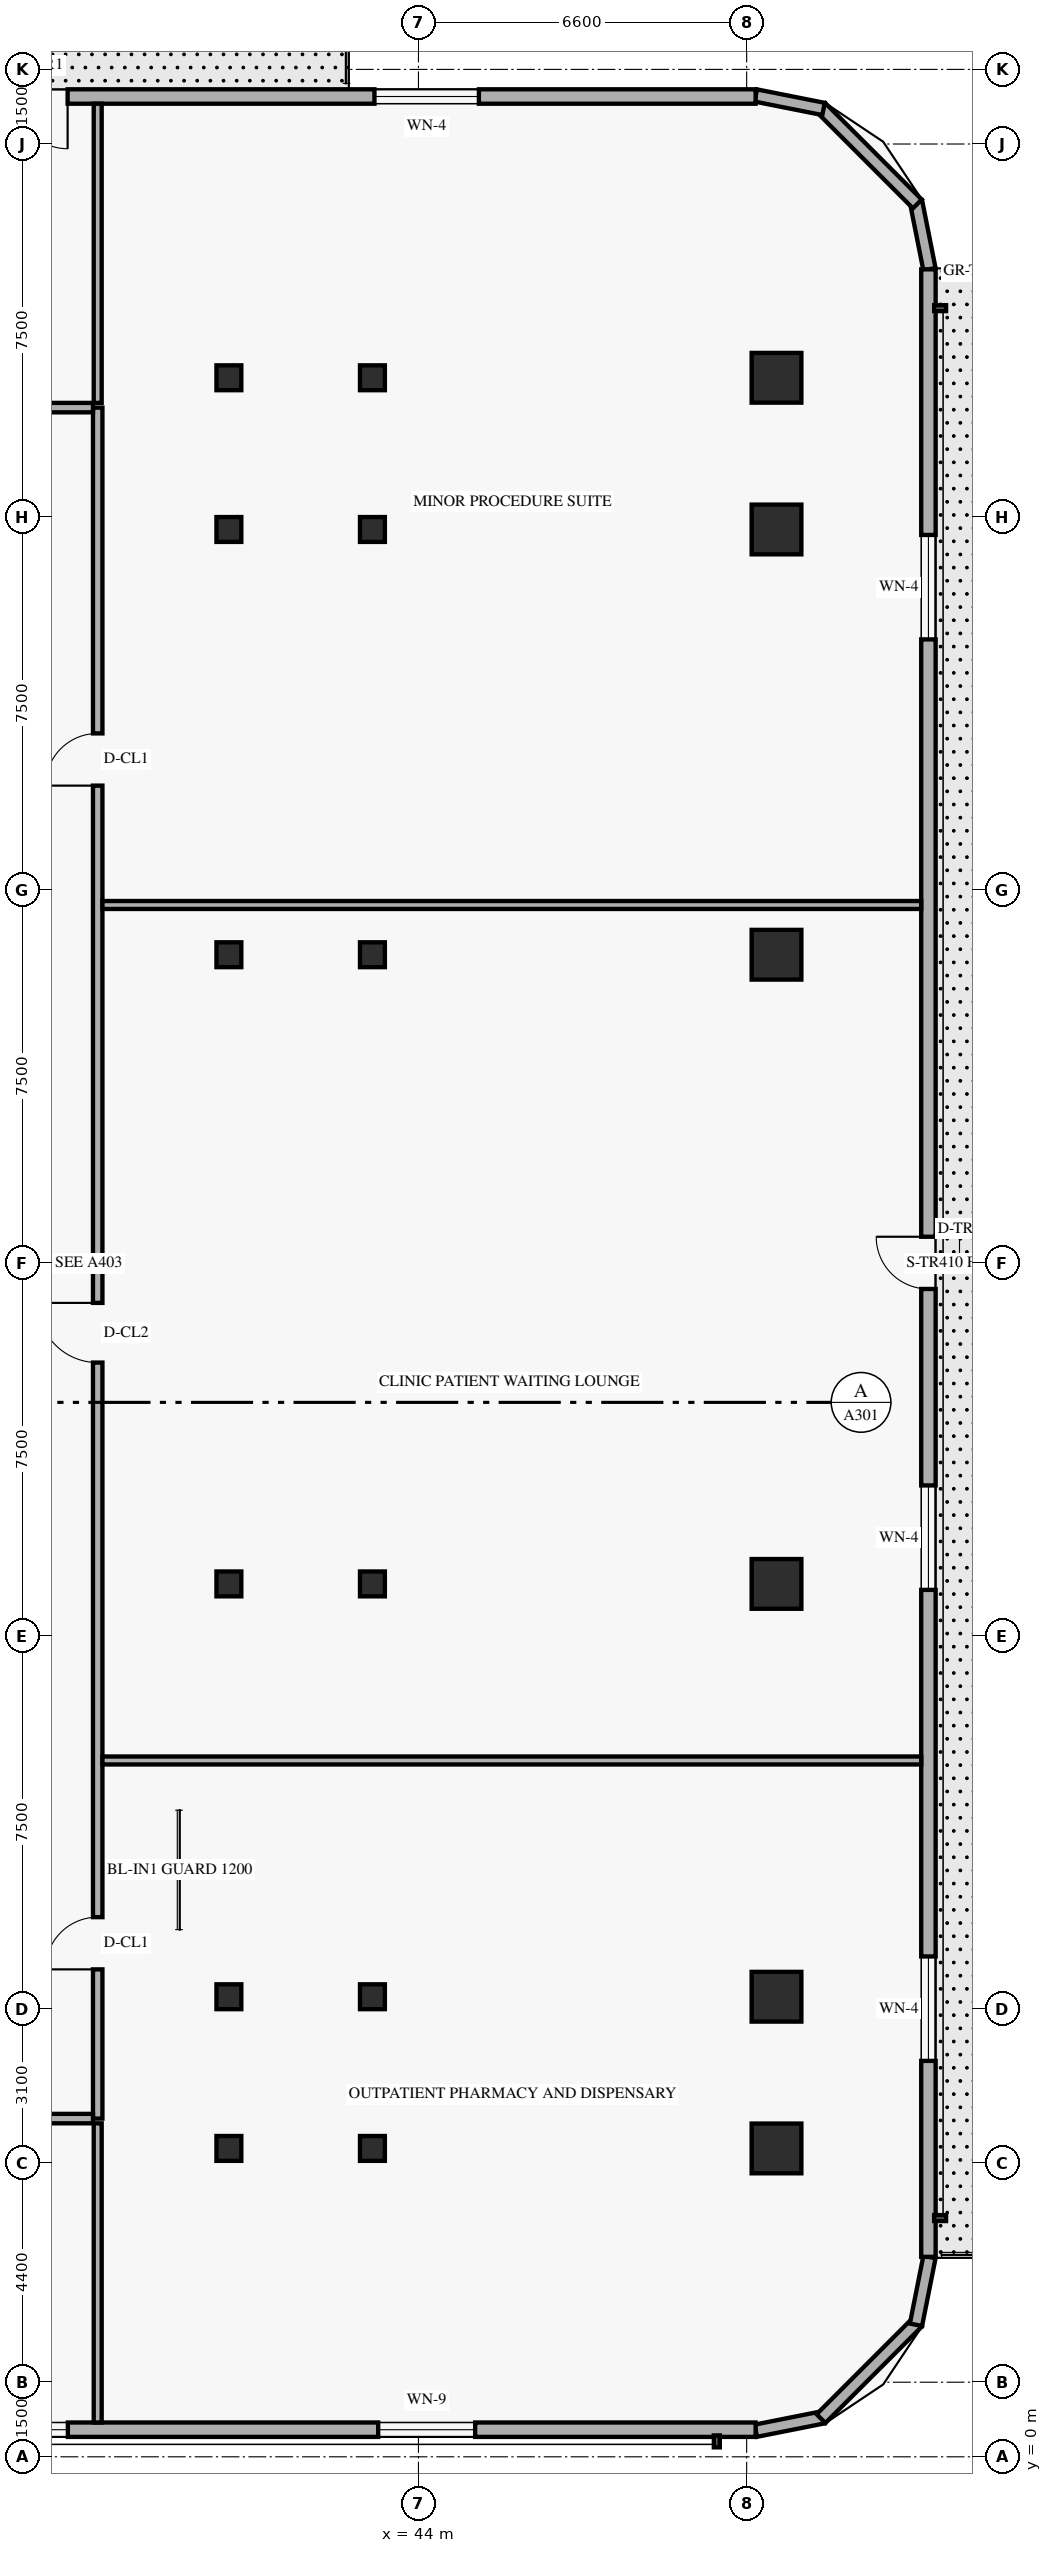
"""IFC4 building model, lengths in metres.
Left out: names, types, materials, properties, quantities, classifications, styles, units other than length and angle.
Written with IfcOpenShell. Run it as: python <this file> out.ifc"""

import sys

from ifc_helpers import new_model, si_unit, direction, frame, frame_2d, origin, origin_2d, place, context, subcontext, project, spatial, rectangle, hollow_rectangle, extrude, element, fill, save


model = new_model("IFC4")
c1 = context("Model", 3, precision=1e-05, world=origin(), true_north=direction((0.0, 1.0)))
c2 = subcontext(c1, "Body", "Model", "MODEL_VIEW")
j1 = project(units=[si_unit("LENGTHUNIT", "METRE"), si_unit("PLANEANGLEUNIT", "RADIAN")], contexts=[c1])
p1 = place(None, origin())
s1 = spatial("IfcSite", under=j1, at=p1, CompositionType="ELEMENT")
p2 = place(p1, origin())
s2 = spatial("IfcBuilding", under=s1, at=p2, CompositionType="ELEMENT")
p3 = place(p2, frame((0.0, 0.0, 4.8)))
s3 = spatial("IfcBuildingStorey", under=s2, at=p3, CompositionType="ELEMENT", Elevation=4.8)
for number, where, z_axis, x_axis in (
    (1, (40.104, 6.2, 0.0), (0.035, 0.0, 0.999), (0.0, 1.0, 0.0)),
    (2, (40.104, 9.25, 0.0), (0.035, 0.0, 0.999), (0.0, 1.0, 0.0)),
    (3, (40.104, 17.55, 0.0), (0.035, 0.0, 0.999), (0.0, 1.0, 0.0)),
    (4, (40.104, 30.2, 0.0), (0.035, 0.0, 0.999), (0.0, 1.0, 0.0)),
    (5, (40.104, 38.75, 0.0), (0.035, 0.0, 0.999), (0.0, 1.0, 0.0)),
    (6, (40.104, 41.8, 0.0), (0.035, 0.0, 0.999), (0.0, 1.0, 0.0)),
):
    element("IfcColumn", number, at=place(p3, frame(where, z_axis=z_axis, x_axis=x_axis)), inside=s3, PredefinedType="COLUMN", context=c2, shape_type="SweptSolid", body=[
        extrude(hollow_rectangle(XDim=0.5, YDim=0.5, WallThickness=0.022, at=origin_2d()), origin(), (0.0, 0.0, 1.0), 4.803),
    ])
for number, where, z_axis, x_axis in (
    (7, (42.935, 6.2, 0.0), (0.058, 0.0, 0.998), (0.0, 1.0, 0.0)),
    (8, (42.935, 9.25, 0.0), (0.058, 0.0, 0.998), (0.0, 1.0, 0.0)),
    (9, (42.935, 17.55, 0.0), (0.058, 0.0, 0.998), (0.0, 1.0, 0.0)),
    (10, (42.935, 30.2, 0.0), (0.058, 0.0, 0.998), (0.0, 1.0, 0.0)),
    (11, (42.935, 38.75, 0.0), (0.058, 0.0, 0.998), (0.0, 1.0, 0.0)),
    (12, (42.935, 41.8, 0.0), (0.058, 0.0, 0.998), (0.0, 1.0, 0.0)),
):
    element("IfcColumn", number, at=place(p3, frame(where, z_axis=z_axis, x_axis=x_axis)), inside=s3, PredefinedType="COLUMN", context=c2, shape_type="SweptSolid", body=[
        extrude(hollow_rectangle(XDim=0.5, YDim=0.5, WallThickness=0.022, at=origin_2d()), origin(), (0.0, 0.0, 1.0), 4.808),
    ])
for number, where, z_axis, x_axis in (
    (13, (51.2, 6.2, 0.0), (0.0, 0.0, 1.0), (1.0, 0.0, 0.0)),
    (14, (51.2, 9.25, 0.0), (0.0, 0.0, 1.0), (1.0, 0.0, 0.0)),
    (15, (51.2, 17.55, 0.0), (0.0, 0.0, 1.0), (1.0, 0.0, 0.0)),
    (16, (51.2, 30.2, 0.0), (0.0, 0.0, 1.0), (1.0, 0.0, 0.0)),
    (17, (51.2, 38.75, 0.0), (0.0, 0.0, 1.0), (1.0, 0.0, 0.0)),
    (18, (51.2, 41.8, 0.0), (0.0, 0.0, 1.0), (1.0, 0.0, 0.0)),
):
    element("IfcColumn", number, at=place(p3, frame(where, z_axis=z_axis, x_axis=x_axis)), inside=s3, PredefinedType="COLUMN", context=c2, shape_type="SweptSolid", body=[
        extrude(rectangle(XDim=1.0, YDim=1.0, at=origin_2d()), origin(), (0.0, 0.0, 1.0), 4.8),
    ])
p4 = place(p3, frame((50.783, 0.524, 0.0), z_axis=(0.0, 0.0, 1.0), x_axis=(0.980809899341, 0.19496651342, 0.0)))
e19 = element("IfcWall", 19, at=p4, inside=s3, PredefinedType="SOLIDWALL", context=c2, shape_type="SweptSolid", body=[
    extrude(rectangle(XDim=1.389, YDim=0.25, at=frame_2d((0.694, 0.0))), origin(), (0.0, 0.0, 1.0), 4.52),
])
p5 = place(p3, frame((52.095, 0.768, 0.0), z_axis=(0.0, 0.0, 1.0), x_axis=(0.707106781187, 0.707106781187, 0.0)))
e20 = element("IfcWall", 20, at=p5, inside=s3, PredefinedType="SOLIDWALL", context=c2, shape_type="SweptSolid", body=[
    extrude(rectangle(XDim=2.739, YDim=0.25, at=frame_2d((1.37, 0.0))), origin(), (0.0, 0.0, 1.0), 4.52),
])
for number, where, z_axis, x_axis in (
    (21, (54.005, 2.655, 0.0), (0.0, 0.0, 1.0), (0.195, 0.981, 0.0)),
    (22, (54.276, 43.983, 0.0), (0.0, 0.0, 1.0), (-0.195, 0.981, 0.0)),
):
    element("IfcWall", number, at=place(p3, frame(where, z_axis=z_axis, x_axis=x_axis)), inside=s3, PredefinedType="SOLIDWALL", context=c2, shape_type="SweptSolid", body=[
        extrude(rectangle(XDim=1.389, YDim=0.25, at=frame_2d((0.694, 0.0))), origin(), (0.0, 0.0, 1.0), 4.52),
    ])
p6 = place(p3, frame((54.032, 45.295, 0.0), z_axis=(0.0, 0.0, 1.0), x_axis=(-0.707106781187, 0.707106781187, 0.0)))
e23 = element("IfcWall", 23, at=p6, inside=s3, PredefinedType="SOLIDWALL", context=c2, shape_type="SweptSolid", body=[
    extrude(rectangle(XDim=2.739, YDim=0.25, at=frame_2d((1.37, 0.0))), origin(), (0.0, 0.0, 1.0), 4.52),
])
p7 = place(p3, frame((52.146, 47.205, 0.0), z_axis=(0.0, 0.0, 1.0), x_axis=(-0.980809899341, 0.19496651342, 0.0)))
e24 = element("IfcWall", 24, at=p7, inside=s3, PredefinedType="SOLIDWALL", context=c2, shape_type="SweptSolid", body=[
    extrude(rectangle(XDim=1.389, YDim=0.25, at=frame_2d((0.694, 0.0))), origin(), (0.0, 0.0, 1.0), 4.52),
])
p8 = place(p3, frame((34.4, 0.545, 0.0), z_axis=(0.0, 0.0, 1.0), x_axis=(1.0, 0.0, 0.0)))
e25 = element("IfcWall", 25, at=p8, inside=s3, PredefinedType="SOLIDWALL", context=c2, shape_type="SweptSolid", body=[
    extrude(rectangle(XDim=16.38, YDim=0.29, at=frame_2d((8.19, 0.0))), origin(), (0.0, 0.0, 1.0), 4.52),
])
p9 = place(p8, frame((0.6, 0.0, 0.85)))
e26 = element("IfcOpeningElement", 26, at=p9, cuts=e25, PredefinedType="OPENING", context=c2, shape_type="SweptSolid", body=[
    extrude(rectangle(XDim=1.95, YDim=1.75, at=frame_2d((0.975, 0.875))), frame((0.0, 0.155, 0.0), z_axis=(0.0, -1.0, 0.0), x_axis=(1.0, 0.0, 0.0)), (0.0, 0.0, 1.0), 0.31),
])
p10 = place(p8, frame((8.79, 0.0, 0.85)))
e27 = element("IfcOpeningElement", 27, at=p10, cuts=e25, PredefinedType="OPENING", context=c2, shape_type="SweptSolid", body=[
    extrude(rectangle(XDim=1.95, YDim=1.75, at=frame_2d((0.975, 0.875))), frame((0.0, 0.155, 0.0), z_axis=(0.0, -1.0, 0.0), x_axis=(1.0, 0.0, 0.0)), (0.0, 0.0, 1.0), 0.31),
])
p11 = place(p3, frame((54.255, 4.02, 0.0), z_axis=(0.0, 0.0, 1.0), x_axis=(0.0, 1.0, 0.0)))
e28 = element("IfcWall", 28, at=p11, inside=s3, PredefinedType="SOLIDWALL", context=c2, shape_type="SweptSolid", body=[
    extrude(rectangle(XDim=39.96, YDim=0.29, at=frame_2d((19.98, 0.0))), origin(), (0.0, 0.0, 1.0), 4.52),
])
p12 = place(p11, frame((19.46, 0.0, 0.0)))
e29 = element("IfcOpeningElement", 29, at=p12, cuts=e28, PredefinedType="OPENING", context=c2, shape_type="SweptSolid", body=[
    extrude(rectangle(XDim=1.05, YDim=2.15, at=frame_2d((0.525, 1.075))), frame((0.0, 0.155, 0.0), z_axis=(0.0, -1.0, 0.0), x_axis=(1.0, 0.0, 0.0)), (0.0, 0.0, 1.0), 0.31),
])
p13 = place(p11, frame((3.94, 0.0, 0.85)))
e30 = element("IfcOpeningElement", 30, at=p13, cuts=e28, PredefinedType="OPENING", context=c2, shape_type="SweptSolid", body=[
    extrude(rectangle(XDim=2.1, YDim=1.75, at=frame_2d((1.05, 0.875))), frame((0.0, 0.155, 0.0), z_axis=(0.0, -1.0, 0.0), x_axis=(1.0, 0.0, 0.0)), (0.0, 0.0, 1.0), 0.31),
])
p14 = place(p11, frame((13.41, 0.0, 0.85)))
e31 = element("IfcOpeningElement", 31, at=p14, cuts=e28, PredefinedType="OPENING", context=c2, shape_type="SweptSolid", body=[
    extrude(rectangle(XDim=2.1, YDim=1.75, at=frame_2d((1.05, 0.875))), frame((0.0, 0.155, 0.0), z_axis=(0.0, -1.0, 0.0), x_axis=(1.0, 0.0, 0.0)), (0.0, 0.0, 1.0), 0.31),
])
p15 = place(p11, frame((32.52, 0.0, 0.85)))
e32 = element("IfcOpeningElement", 32, at=p15, cuts=e28, PredefinedType="OPENING", context=c2, shape_type="SweptSolid", body=[
    extrude(rectangle(XDim=2.1, YDim=1.75, at=frame_2d((1.05, 0.875))), frame((0.0, 0.155, 0.0), z_axis=(0.0, -1.0, 0.0), x_axis=(1.0, 0.0, 0.0)), (0.0, 0.0, 1.0), 0.31),
])
p16 = place(p3, frame((50.78, 47.455, 0.0), z_axis=(0.0, 0.0, 1.0), x_axis=(-1.0, 0.0, 0.0)))
e33 = element("IfcWall", 33, at=p16, inside=s3, PredefinedType="SOLIDWALL", context=c2, shape_type="SweptSolid", body=[
    extrude(rectangle(XDim=46.36, YDim=0.29, at=frame_2d((23.18, 0.0))), origin(), (0.0, 0.0, 1.0), 4.52),
])
p17 = place(p16, frame((13.835, 0.0, 0.0)))
e34 = element("IfcOpeningElement", 34, at=p17, cuts=e33, PredefinedType="OPENING", context=c2, shape_type="SweptSolid", body=[
    extrude(rectangle(XDim=1.05, YDim=2.15, at=frame_2d((0.525, 1.075))), frame((0.0, 0.155, 0.0), z_axis=(0.0, -1.0, 0.0), x_axis=(1.0, 0.0, 0.0)), (0.0, 0.0, 1.0), 0.31),
])
p18 = place(p16, frame((27.13, 0.0, 0.0)))
e35 = element("IfcOpeningElement", 35, at=p18, cuts=e33, PredefinedType="OPENING", context=c2, shape_type="SweptSolid", body=[
    extrude(rectangle(XDim=1.4, YDim=2.15, at=frame_2d((0.7, 1.075))), frame((0.0, 0.155, 0.0), z_axis=(0.0, -1.0, 0.0), x_axis=(1.0, 0.0, 0.0)), (0.0, 0.0, 1.0), 0.31),
])
p19 = place(p16, frame((41.945, 0.0, 0.85)))
e36 = element("IfcOpeningElement", 36, at=p19, cuts=e33, PredefinedType="OPENING", context=c2, shape_type="SweptSolid", body=[
    extrude(rectangle(XDim=2.1, YDim=1.75, at=frame_2d((1.05, 0.875))), frame((0.0, 0.155, 0.0), z_axis=(0.0, -1.0, 0.0), x_axis=(1.0, 0.0, 0.0)), (0.0, 0.0, 1.0), 0.31),
])
p20 = place(p16, frame((19.982, 0.0, 0.85)))
e37 = element("IfcOpeningElement", 37, at=p20, cuts=e33, PredefinedType="OPENING", context=c2, shape_type="SweptSolid", body=[
    extrude(rectangle(XDim=2.1, YDim=1.75, at=frame_2d((1.05, 0.875))), frame((0.0, 0.155, 0.0), z_axis=(0.0, -1.0, 0.0), x_axis=(1.0, 0.0, 0.0)), (0.0, 0.0, 1.0), 0.31),
])
p21 = place(p16, frame((5.565, 0.0, 0.85)))
e38 = element("IfcOpeningElement", 38, at=p21, cuts=e33, PredefinedType="OPENING", context=c2, shape_type="SweptSolid", body=[
    extrude(rectangle(XDim=2.1, YDim=1.75, at=frame_2d((1.05, 0.875))), frame((0.0, 0.155, 0.0), z_axis=(0.0, -1.0, 0.0), x_axis=(1.0, 0.0, 0.0)), (0.0, 0.0, 1.0), 0.31),
])
p22 = place(p3, frame((37.55, 6.8, 0.0), z_axis=(0.0, 0.0, 1.0), x_axis=(0.0, 1.0, 0.0)))
e39 = element("IfcWall", 39, at=p22, inside=s3, PredefinedType="STANDARD", context=c2, shape_type="SweptSolid", body=[
    extrude(rectangle(XDim=34.4, YDim=0.19, at=frame_2d((17.2, 0.0))), origin(), (0.0, 0.0, 1.0), 3.502),
])
p23 = place(p22, frame((3.0, 0.0, 0.0)))
e40 = element("IfcOpeningElement", 40, at=p23, cuts=e39, PredefinedType="OPENING", context=c2, shape_type="SweptSolid", body=[
    extrude(rectangle(XDim=1.05, YDim=2.15, at=frame_2d((0.525, 1.075))), frame((0.0, 0.105, 0.0), z_axis=(0.0, -1.0, 0.0), x_axis=(1.0, 0.0, 0.0)), (0.0, 0.0, 1.0), 0.21),
])
p24 = place(p22, frame((15.2, 0.0, 0.0)))
e41 = element("IfcOpeningElement", 41, at=p24, cuts=e39, PredefinedType="OPENING", context=c2, shape_type="SweptSolid", body=[
    extrude(rectangle(XDim=1.2, YDim=2.15, at=frame_2d((0.6, 1.075))), frame((0.0, 0.105, 0.0), z_axis=(0.0, -1.0, 0.0), x_axis=(1.0, 0.0, 0.0)), (0.0, 0.0, 1.0), 0.21),
])
p25 = place(p22, frame((26.8, 0.0, 0.0)))
e42 = element("IfcOpeningElement", 42, at=p25, cuts=e39, PredefinedType="OPENING", context=c2, shape_type="SweptSolid", body=[
    extrude(rectangle(XDim=1.05, YDim=2.15, at=frame_2d((0.525, 1.075))), frame((0.0, 0.105, 0.0), z_axis=(0.0, -1.0, 0.0), x_axis=(1.0, 0.0, 0.0)), (0.0, 0.0, 1.0), 0.21),
])
p26 = place(p3, frame((13.0, 6.8, 0.0), z_axis=(0.0, 0.0, 1.0), x_axis=(1.0, 0.0, 0.0)))
e43 = element("IfcWall", 43, at=p26, inside=s3, PredefinedType="STANDARD", context=c2, shape_type="SweptSolid", body=[
    extrude(rectangle(XDim=24.455, YDim=0.19, at=frame_2d((12.228, 0.0))), origin(), (0.0, 0.0, 1.0), 3.732),
])
p27 = place(p26, frame((9.0, 0.0, 0.0)))
e44 = element("IfcOpeningElement", 44, at=p27, cuts=e43, PredefinedType="OPENING", context=c2, shape_type="SweptSolid", body=[
    extrude(rectangle(XDim=0.95, YDim=2.15, at=frame_2d((0.475, 1.075))), frame((0.0, 0.105, 0.0), z_axis=(0.0, -1.0, 0.0), x_axis=(1.0, 0.0, 0.0)), (0.0, 0.0, 1.0), 0.21),
])
p28 = place(p3, frame((13.0, 41.2, 0.0), z_axis=(0.0, 0.0, 1.0), x_axis=(1.0, 0.0, 0.0)))
e45 = element("IfcWall", 45, at=p28, inside=s3, PredefinedType="STANDARD", context=c2, shape_type="SweptSolid", body=[
    extrude(rectangle(XDim=24.455, YDim=0.19, at=frame_2d((12.228, 0.0))), origin(), (0.0, 0.0, 1.0), 3.732),
])
p29 = place(p28, frame((9.0, 0.0, 0.0)))
e46 = element("IfcOpeningElement", 46, at=p29, cuts=e45, PredefinedType="OPENING", context=c2, shape_type="SweptSolid", body=[
    extrude(rectangle(XDim=0.95, YDim=2.15, at=frame_2d((0.475, 1.075))), frame((0.0, 0.105, 0.0), z_axis=(0.0, -1.0, 0.0), x_axis=(1.0, 0.0, 0.0)), (0.0, 0.0, 1.0), 0.21),
])
for number, where, z_axis, x_axis in (
    (47, (37.55, 0.69, 0.0), (0.0, 0.0, 1.0), (0.0, 1.0, 0.0)),
    (48, (37.55, 41.295, 0.0), (0.0, 0.0, 1.0), (0.0, 1.0, 0.0)),
):
    element("IfcWall", number, at=place(p3, frame(where, z_axis=z_axis, x_axis=x_axis)), inside=s3, PredefinedType="PARTITIONING", context=c2, shape_type="SweptSolid", body=[
        extrude(rectangle(XDim=6.015, YDim=0.16, at=frame_2d((3.008, 0.0))), origin(), (0.0, 0.0, 1.0), 3.969),
    ])
for number, where, z_axis, x_axis in (
    (49, (37.645, 14.0, 0.0), (0.0, 0.0, 1.0), (1.0, 0.0, 0.0)),
    (50, (37.645, 31.2, 0.0), (0.0, 0.0, 1.0), (1.0, 0.0, 0.0)),
):
    element("IfcWall", number, at=place(p3, frame(where, z_axis=z_axis, x_axis=x_axis)), inside=s3, PredefinedType="PARTITIONING", context=c2, shape_type="SweptSolid", body=[
        extrude(rectangle(XDim=16.465, YDim=0.16, at=frame_2d((8.232, 0.0))), origin(), (0.0, 0.0, 1.0), 3.732),
    ])
p30 = place(p9, origin())
e51 = element("IfcWindow", 51, at=p30, inside=s3, PartitioningType="SINGLE_PANEL", PredefinedType="WINDOW", context=c2, shape_type="SweptSolid", body=[
    extrude(rectangle(XDim=1.95, YDim=1.75, at=frame_2d((0.975, 0.875))), frame((0.0, 0.03, 0.0), z_axis=(0.0, -1.0, 0.0), x_axis=(1.0, 0.0, 0.0)), (0.0, 0.0, 1.0), 0.06),
])
fill(e26, e51)
p31 = place(p10, origin())
e52 = element("IfcWindow", 52, at=p31, inside=s3, PartitioningType="SINGLE_PANEL", PredefinedType="WINDOW", context=c2, shape_type="SweptSolid", body=[
    extrude(rectangle(XDim=1.95, YDim=1.75, at=frame_2d((0.975, 0.875))), frame((0.0, 0.03, 0.0), z_axis=(0.0, -1.0, 0.0), x_axis=(1.0, 0.0, 0.0)), (0.0, 0.0, 1.0), 0.06),
])
fill(e27, e52)
p32 = place(p12, origin())
e53 = element("IfcDoor", 53, at=p32, inside=s3, OperationType="SINGLE_SWING_RIGHT", PredefinedType="DOOR", context=c2, shape_type="SweptSolid", body=[
    extrude(rectangle(XDim=1.05, YDim=2.15, at=frame_2d((0.525, 1.075))), frame((0.0, 0.025, 0.0), z_axis=(0.0, -1.0, 0.0), x_axis=(1.0, 0.0, 0.0)), (0.0, 0.0, 1.0), 0.05),
])
fill(e29, e53)
p33 = place(p13, origin())
e54 = element("IfcWindow", 54, at=p33, inside=s3, PartitioningType="SINGLE_PANEL", PredefinedType="WINDOW", context=c2, shape_type="SweptSolid", body=[
    extrude(rectangle(XDim=2.1, YDim=1.75, at=frame_2d((1.05, 0.875))), frame((0.0, 0.03, 0.0), z_axis=(0.0, -1.0, 0.0), x_axis=(1.0, 0.0, 0.0)), (0.0, 0.0, 1.0), 0.06),
])
fill(e30, e54)
p34 = place(p14, origin())
e55 = element("IfcWindow", 55, at=p34, inside=s3, PartitioningType="SINGLE_PANEL", PredefinedType="WINDOW", context=c2, shape_type="SweptSolid", body=[
    extrude(rectangle(XDim=2.1, YDim=1.75, at=frame_2d((1.05, 0.875))), frame((0.0, 0.03, 0.0), z_axis=(0.0, -1.0, 0.0), x_axis=(1.0, 0.0, 0.0)), (0.0, 0.0, 1.0), 0.06),
])
fill(e31, e55)
p35 = place(p15, origin())
e56 = element("IfcWindow", 56, at=p35, inside=s3, PartitioningType="SINGLE_PANEL", PredefinedType="WINDOW", context=c2, shape_type="SweptSolid", body=[
    extrude(rectangle(XDim=2.1, YDim=1.75, at=frame_2d((1.05, 0.875))), frame((0.0, 0.03, 0.0), z_axis=(0.0, -1.0, 0.0), x_axis=(1.0, 0.0, 0.0)), (0.0, 0.0, 1.0), 0.06),
])
fill(e32, e56)
p36 = place(p17, origin())
e57 = element("IfcDoor", 57, at=p36, inside=s3, OperationType="SINGLE_SWING_LEFT", PredefinedType="DOOR", context=c2, shape_type="SweptSolid", body=[
    extrude(rectangle(XDim=1.05, YDim=2.15, at=frame_2d((0.525, 1.075))), frame((0.0, 0.025, 0.0), z_axis=(0.0, -1.0, 0.0), x_axis=(1.0, 0.0, 0.0)), (0.0, 0.0, 1.0), 0.05),
])
fill(e34, e57)
p37 = place(p21, origin())
e58 = element("IfcWindow", 58, at=p37, inside=s3, PartitioningType="SINGLE_PANEL", PredefinedType="WINDOW", context=c2, shape_type="SweptSolid", body=[
    extrude(rectangle(XDim=2.1, YDim=1.75, at=frame_2d((1.05, 0.875))), frame((0.0, 0.03, 0.0), z_axis=(0.0, -1.0, 0.0), x_axis=(1.0, 0.0, 0.0)), (0.0, 0.0, 1.0), 0.06),
])
fill(e38, e58)
p38 = place(p23, origin())
e59 = element("IfcDoor", 59, at=p38, inside=s3, OperationType="SINGLE_SWING_LEFT", PredefinedType="DOOR", context=c2, shape_type="SweptSolid", body=[
    extrude(rectangle(XDim=1.05, YDim=2.15, at=frame_2d((0.525, 1.075))), frame((0.0, 0.025, 0.0), z_axis=(0.0, -1.0, 0.0), x_axis=(1.0, 0.0, 0.0)), (0.0, 0.0, 1.0), 0.05),
])
fill(e40, e59)
p39 = place(p24, origin())
e60 = element("IfcDoor", 60, at=p39, inside=s3, OperationType="SINGLE_SWING_RIGHT", PredefinedType="DOOR", context=c2, shape_type="SweptSolid", body=[
    extrude(rectangle(XDim=1.2, YDim=2.15, at=frame_2d((0.6, 1.075))), frame((0.0, 0.025, 0.0), z_axis=(0.0, -1.0, 0.0), x_axis=(1.0, 0.0, 0.0)), (0.0, 0.0, 1.0), 0.05),
])
fill(e41, e60)
p40 = place(p25, origin())
e61 = element("IfcDoor", 61, at=p40, inside=s3, OperationType="SINGLE_SWING_LEFT", PredefinedType="DOOR", context=c2, shape_type="SweptSolid", body=[
    extrude(rectangle(XDim=1.05, YDim=2.15, at=frame_2d((0.525, 1.075))), frame((0.0, 0.025, 0.0), z_axis=(0.0, -1.0, 0.0), x_axis=(1.0, 0.0, 0.0)), (0.0, 0.0, 1.0), 0.05),
])
fill(e42, e61)
save(model, sys.argv[1])
